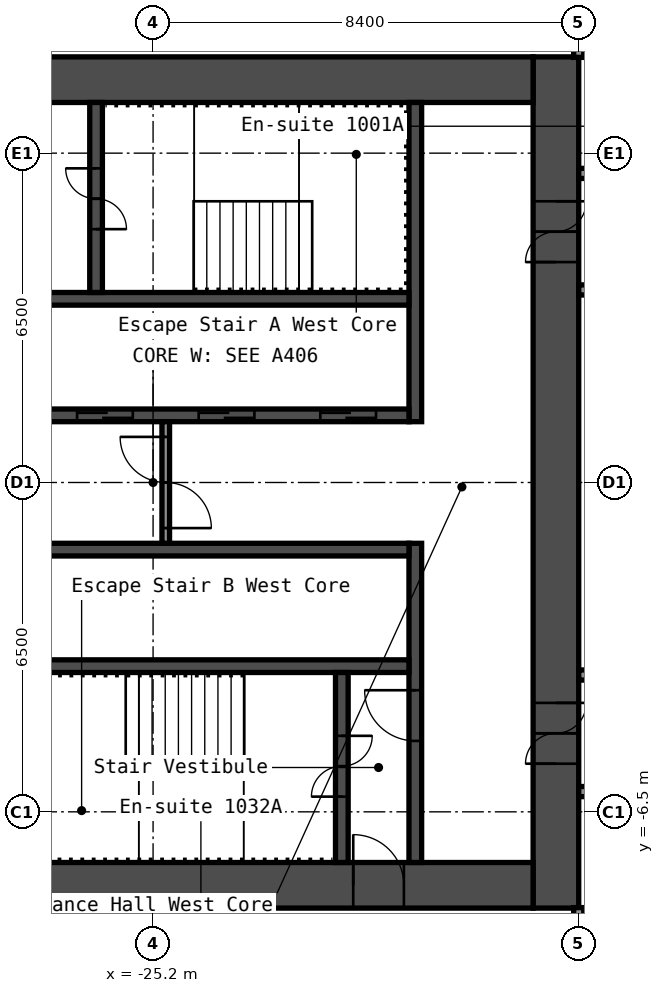
"""IFC4 building model, lengths in metres.
Left out: names, types, materials, properties, quantities, classifications, styles, units other than length and angle.
Written with IfcOpenShell. Run it as: python <this file> out.ifc"""

import sys

from ifc_helpers import new_model, si_unit, direction, frame, frame_2d, origin, place, context, subcontext, project, spatial, rectangle, extrude, element, fill, save


model = new_model("IFC4")
c1 = context("Model", 3, precision=1e-05, world=origin(), true_north=direction((0.0, 1.0)))
c2 = subcontext(c1, "Body", "Model", "MODEL_VIEW")
j1 = project(units=[si_unit("LENGTHUNIT", "METRE"), si_unit("PLANEANGLEUNIT", "RADIAN")], contexts=[c1])
p1 = place(None, origin())
s1 = spatial("IfcSite", under=j1, at=p1, CompositionType="ELEMENT")
p2 = place(p1, origin())
s2 = spatial("IfcBuilding", under=s1, at=p2, CompositionType="ELEMENT")
p3 = place(p2, frame((0.0, 0.0, 39.0)))
s3 = spatial("IfcBuildingStorey", under=s2, at=p3, CompositionType="ELEMENT", Elevation=39.0)
p4 = place(p3, frame((-17.25, -8.4, 0.0), z_axis=(0.0, 0.0, 1.0), x_axis=(0.0, 1.0, 0.0)))
e1 = element("IfcWall", 1, at=p4, inside=s3, PredefinedType="SHEAR", context=c2, shape_type="SweptSolid", body=[
    extrude(rectangle(XDim=16.8, YDim=0.9, at=frame_2d((8.4, 0.0))), origin(), (0.0, 0.0, 1.0), 2.8),
])
p5 = place(p4, frame((12.75, 0.0, 0.0)))
e2 = element("IfcOpeningElement", 2, at=p5, cuts=e1, PredefinedType="OPENING", context=c2, shape_type="SweptSolid", body=[
    extrude(rectangle(XDim=1.2, YDim=2.1, at=frame_2d((0.6, 1.05))), frame((0.0, 0.46, 0.0), z_axis=(0.0, -1.0, 0.0), x_axis=(1.0, 0.0, 0.0)), (0.0, 0.0, 1.0), 0.92),
])
p6 = place(p4, frame((2.85, 0.0, 0.0)))
e3 = element("IfcOpeningElement", 3, at=p6, cuts=e1, PredefinedType="OPENING", context=c2, shape_type="SweptSolid", body=[
    extrude(rectangle(XDim=1.2, YDim=2.1, at=frame_2d((0.6, 1.05))), frame((0.0, 0.46, 0.0), z_axis=(0.0, -1.0, 0.0), x_axis=(1.0, 0.0, 0.0)), (0.0, 0.0, 1.0), 0.92),
])
p7 = place(p3, frame((-32.7, 7.95, 0.0), z_axis=(0.0, 0.0, 1.0), x_axis=(1.0, 0.0, 0.0)))
e4 = element("IfcWall", 4, at=p7, inside=s3, PredefinedType="SHEAR", context=c2, shape_type="SweptSolid", body=[
    extrude(rectangle(XDim=15.0, YDim=0.9, at=frame_2d((7.5, 0.0))), origin(), (0.0, 0.0, 1.0), 2.8),
])
p8 = place(p7, frame((3.4, 0.0, 0.0)))
e5 = element("IfcOpeningElement", 5, at=p8, cuts=e4, PredefinedType="OPENING", context=c2, shape_type="SweptSolid", body=[
    extrude(rectangle(XDim=1.2, YDim=2.1, at=frame_2d((0.6, 1.05))), frame((0.0, 0.46, 0.0), z_axis=(0.0, -1.0, 0.0), x_axis=(1.0, 0.0, 0.0)), (0.0, 0.0, 1.0), 0.92),
])
p9 = place(p7, frame((0.75, 0.0, 0.0)))
e6 = element("IfcOpeningElement", 6, at=p9, cuts=e4, PredefinedType="OPENING", context=c2, shape_type="SweptSolid", body=[
    extrude(rectangle(XDim=0.9, YDim=2.1, at=frame_2d((0.45, 1.05))), frame((0.0, 0.46, 0.0), z_axis=(0.0, -1.0, 0.0), x_axis=(1.0, 0.0, 0.0)), (0.0, 0.0, 1.0), 0.92),
])
p10 = place(p3, frame((-32.7, -7.95, 0.0), z_axis=(0.0, 0.0, 1.0), x_axis=(1.0, 0.0, 0.0)))
e7 = element("IfcWall", 7, at=p10, inside=s3, PredefinedType="SHEAR", context=c2, shape_type="SweptSolid", body=[
    extrude(rectangle(XDim=15.0, YDim=0.9, at=frame_2d((7.5, 0.0))), origin(), (0.0, 0.0, 1.0), 2.8),
])
p11 = place(p10, frame((11.45, 0.0, 0.0)))
e8 = element("IfcOpeningElement", 8, at=p11, cuts=e7, PredefinedType="OPENING", context=c2, shape_type="SweptSolid", body=[
    extrude(rectangle(XDim=1.0, YDim=2.1, at=frame_2d((0.5, 1.05))), frame((0.0, 0.46, 0.0), z_axis=(0.0, -1.0, 0.0), x_axis=(1.0, 0.0, 0.0)), (0.0, 0.0, 1.0), 0.92),
])
p12 = place(p3, frame((-20.025, 1.2, 0.0), z_axis=(0.0, 0.0, 1.0), x_axis=(0.0, 1.0, 0.0)))
e9 = element("IfcWall", 9, at=p12, inside=s3, PredefinedType="SHEAR", context=c2, shape_type="SweptSolid", body=[
    extrude(rectangle(XDim=6.3, YDim=0.25, at=frame_2d((3.15, 0.0))), origin(), (0.0, 0.0, 1.0), 2.8),
])
p13 = place(p3, frame((-20.025, -7.5, 0.0), z_axis=(0.0, 0.0, 1.0), x_axis=(0.0, 1.0, 0.0)))
e10 = element("IfcWall", 10, at=p13, inside=s3, PredefinedType="SHEAR", context=c2, shape_type="SweptSolid", body=[
    extrude(rectangle(XDim=6.3, YDim=0.25, at=frame_2d((3.15, 0.0))), origin(), (0.0, 0.0, 1.0), 2.8),
])
p14 = place(p13, frame((2.4, 0.0, 0.0)))
e11 = element("IfcOpeningElement", 11, at=p14, cuts=e10, PredefinedType="OPENING", context=c2, shape_type="SweptSolid", body=[
    extrude(rectangle(XDim=1.0, YDim=2.1, at=frame_2d((0.5, 1.05))), frame((0.0, 0.135, 0.0), z_axis=(0.0, -1.0, 0.0), x_axis=(1.0, 0.0, 0.0)), (0.0, 0.0, 1.0), 0.27),
])
p15 = place(p3, frame((-27.65, 1.325, 0.0), z_axis=(0.0, 0.0, 1.0), x_axis=(1.0, 0.0, 0.0)))
e12 = element("IfcWall", 12, at=p15, inside=s3, PredefinedType="SHEAR", context=c2, shape_type="SweptSolid", body=[
    extrude(rectangle(XDim=7.5, YDim=0.25, at=frame_2d((3.75, 0.0))), origin(), (0.0, 0.0, 1.0), 2.8),
])
p16 = place(p15, frame((5.75, 0.0, 0.0)))
e13 = element("IfcOpeningElement", 13, at=p16, cuts=e12, PredefinedType="OPENING", context=c2, shape_type="SweptSolid", body=[
    extrude(rectangle(XDim=1.1, YDim=2.1, at=frame_2d((0.55, 1.05))), frame((0.0, 0.135, 0.0), z_axis=(0.0, -1.0, 0.0), x_axis=(1.0, 0.0, 0.0)), (0.0, 0.0, 1.0), 0.27),
])
p17 = place(p15, frame((3.35, 0.0, 0.0)))
e14 = element("IfcOpeningElement", 14, at=p17, cuts=e12, PredefinedType="OPENING", context=c2, shape_type="SweptSolid", body=[
    extrude(rectangle(XDim=1.1, YDim=2.1, at=frame_2d((0.55, 1.05))), frame((0.0, 0.135, 0.0), z_axis=(0.0, -1.0, 0.0), x_axis=(1.0, 0.0, 0.0)), (0.0, 0.0, 1.0), 0.27),
])
p18 = place(p15, frame((0.95, 0.0, 0.0)))
e15 = element("IfcOpeningElement", 15, at=p18, cuts=e12, PredefinedType="OPENING", context=c2, shape_type="SweptSolid", body=[
    extrude(rectangle(XDim=1.1, YDim=2.1, at=frame_2d((0.55, 1.05))), frame((0.0, 0.135, 0.0), z_axis=(0.0, -1.0, 0.0), x_axis=(1.0, 0.0, 0.0)), (0.0, 0.0, 1.0), 0.27),
])
p19 = place(p3, frame((-27.65, 3.625, 0.0), z_axis=(0.0, 0.0, 1.0), x_axis=(1.0, 0.0, 0.0)))
e16 = element("IfcWall", 16, at=p19, inside=s3, PredefinedType="SHEAR", context=c2, shape_type="SweptSolid", body=[
    extrude(rectangle(XDim=7.5, YDim=0.25, at=frame_2d((3.75, 0.0))), origin(), (0.0, 0.0, 1.0), 2.8),
])
p20 = place(p3, frame((-26.325, 3.75, 0.0), z_axis=(0.0, 0.0, 1.0), x_axis=(0.0, 1.0, 0.0)))
e17 = element("IfcWall", 17, at=p20, inside=s3, PredefinedType="SHEAR", context=c2, shape_type="SweptSolid", body=[
    extrude(rectangle(XDim=3.75, YDim=0.25, at=frame_2d((1.875, 0.0))), origin(), (0.0, 0.0, 1.0), 2.8),
])
p21 = place(p20, frame((1.25, 0.0, 0.0)))
e18 = element("IfcOpeningElement", 18, at=p21, cuts=e17, PredefinedType="OPENING", context=c2, shape_type="SweptSolid", body=[
    extrude(rectangle(XDim=1.2, YDim=2.1, at=frame_2d((0.6, 1.05))), frame((0.0, 0.135, 0.0), z_axis=(0.0, -1.0, 0.0), x_axis=(1.0, 0.0, 0.0)), (0.0, 0.0, 1.0), 0.27),
])
for number, where, z_axis, x_axis in (
    (19, (-27.65, -1.325, 0.0), (0.0, 0.0, 1.0), (1.0, 0.0, 0.0)),
    (20, (-27.65, -3.625, 0.0), (0.0, 0.0, 1.0), (1.0, 0.0, 0.0)),
):
    element("IfcWall", number, at=place(p3, frame(where, z_axis=z_axis, x_axis=x_axis)), inside=s3, PredefinedType="SHEAR", context=c2, shape_type="SweptSolid", body=[
        extrude(rectangle(XDim=7.5, YDim=0.25, at=frame_2d((3.75, 0.0))), origin(), (0.0, 0.0, 1.0), 2.8),
    ])
p22 = place(p3, frame((-21.475, -7.5, 0.0), z_axis=(0.0, 0.0, 1.0), x_axis=(0.0, 1.0, 0.0)))
e21 = element("IfcWall", 21, at=p22, inside=s3, PredefinedType="SHEAR", context=c2, shape_type="SweptSolid", body=[
    extrude(rectangle(XDim=3.75, YDim=0.25, at=frame_2d((1.875, 0.0))), origin(), (0.0, 0.0, 1.0), 2.8),
])
p23 = place(p22, frame((1.3, 0.0, 0.0)))
e22 = element("IfcOpeningElement", 22, at=p23, cuts=e21, PredefinedType="OPENING", context=c2, shape_type="SweptSolid", body=[
    extrude(rectangle(XDim=1.2, YDim=2.1, at=frame_2d((0.6, 1.05))), frame((0.0, 0.135, 0.0), z_axis=(0.0, -1.0, 0.0), x_axis=(1.0, 0.0, 0.0)), (0.0, 0.0, 1.0), 0.27),
])
p24 = place(p3, frame((-24.95, -1.2, 0.0), z_axis=(0.0, 0.0, 1.0), x_axis=(0.0, 1.0, 0.0)))
e23 = element("IfcWall", 23, at=p24, inside=s3, PredefinedType="PARTITIONING", context=c2, shape_type="SweptSolid", body=[
    extrude(rectangle(XDim=2.4, YDim=0.15, at=frame_2d((1.2, 0.0))), origin(), (0.0, 0.0, 1.0), 2.8),
])
p25 = place(p24, frame((0.3, 0.0, 0.0)))
e24 = element("IfcOpeningElement", 24, at=p25, cuts=e23, PredefinedType="OPENING", context=c2, shape_type="SweptSolid", body=[
    extrude(rectangle(XDim=1.8, YDim=2.1, at=frame_2d((0.9, 1.05))), frame((0.0, 0.085, 0.0), z_axis=(0.0, -1.0, 0.0), x_axis=(1.0, 0.0, 0.0)), (0.0, 0.0, 1.0), 0.17),
])
p26 = place(p3, frame((-16.8, -6.1, 0.0), z_axis=(0.0, 0.0, 1.0), x_axis=(1.0, 0.0, 0.0)))
e25 = element("IfcWall", 25, at=p26, inside=s3, PredefinedType="PARTITIONING", context=c2, shape_type="SweptSolid", body=[
    extrude(rectangle(XDim=33.6, YDim=0.2, at=frame_2d((16.8, 0.0))), origin(), (0.0, 0.0, 1.0), 2.8),
])
p27 = place(p26, frame((2.85, 0.0, 0.0)))
e26 = element("IfcOpeningElement", 26, at=p27, cuts=e25, PredefinedType="OPENING", context=c2, shape_type="SweptSolid", body=[
    extrude(rectangle(XDim=1.0, YDim=2.1, at=frame_2d((0.5, 1.05))), frame((0.0, 0.11, 0.0), z_axis=(0.0, -1.0, 0.0), x_axis=(1.0, 0.0, 0.0)), (0.0, 0.0, 1.0), 0.22),
])
p28 = place(p26, frame((4.55, 0.0, 0.0)))
e27 = element("IfcOpeningElement", 27, at=p28, cuts=e25, PredefinedType="OPENING", context=c2, shape_type="SweptSolid", body=[
    extrude(rectangle(XDim=1.0, YDim=2.1, at=frame_2d((0.5, 1.05))), frame((0.0, 0.11, 0.0), z_axis=(0.0, -1.0, 0.0), x_axis=(1.0, 0.0, 0.0)), (0.0, 0.0, 1.0), 0.22),
])
p29 = place(p26, frame((11.25, 0.0, 0.0)))
e28 = element("IfcOpeningElement", 28, at=p29, cuts=e25, PredefinedType="OPENING", context=c2, shape_type="SweptSolid", body=[
    extrude(rectangle(XDim=1.0, YDim=2.1, at=frame_2d((0.5, 1.05))), frame((0.0, 0.11, 0.0), z_axis=(0.0, -1.0, 0.0), x_axis=(1.0, 0.0, 0.0)), (0.0, 0.0, 1.0), 0.22),
])
p30 = place(p26, frame((12.95, 0.0, 0.0)))
e29 = element("IfcOpeningElement", 29, at=p30, cuts=e25, PredefinedType="OPENING", context=c2, shape_type="SweptSolid", body=[
    extrude(rectangle(XDim=1.0, YDim=2.1, at=frame_2d((0.5, 1.05))), frame((0.0, 0.11, 0.0), z_axis=(0.0, -1.0, 0.0), x_axis=(1.0, 0.0, 0.0)), (0.0, 0.0, 1.0), 0.22),
])
p31 = place(p26, frame((18.28, 0.0, 0.0)))
e30 = element("IfcOpeningElement", 30, at=p31, cuts=e25, PredefinedType="OPENING", context=c2, shape_type="SweptSolid", body=[
    extrude(rectangle(XDim=0.9, YDim=2.1, at=frame_2d((0.45, 1.05))), frame((0.0, 0.11, 0.0), z_axis=(0.0, -1.0, 0.0), x_axis=(1.0, 0.0, 0.0)), (0.0, 0.0, 1.0), 0.22),
])
p32 = place(p26, frame((22.48, 0.0, 0.0)))
e31 = element("IfcOpeningElement", 31, at=p32, cuts=e25, PredefinedType="OPENING", context=c2, shape_type="SweptSolid", body=[
    extrude(rectangle(XDim=0.9, YDim=2.1, at=frame_2d((0.45, 1.05))), frame((0.0, 0.11, 0.0), z_axis=(0.0, -1.0, 0.0), x_axis=(1.0, 0.0, 0.0)), (0.0, 0.0, 1.0), 0.22),
])
p33 = place(p26, frame((28.05, 0.0, 0.0)))
e32 = element("IfcOpeningElement", 32, at=p33, cuts=e25, PredefinedType="OPENING", context=c2, shape_type="SweptSolid", body=[
    extrude(rectangle(XDim=1.0, YDim=2.1, at=frame_2d((0.5, 1.05))), frame((0.0, 0.11, 0.0), z_axis=(0.0, -1.0, 0.0), x_axis=(1.0, 0.0, 0.0)), (0.0, 0.0, 1.0), 0.22),
])
p34 = place(p26, frame((29.75, 0.0, 0.0)))
e33 = element("IfcOpeningElement", 33, at=p34, cuts=e25, PredefinedType="OPENING", context=c2, shape_type="SweptSolid", body=[
    extrude(rectangle(XDim=1.0, YDim=2.1, at=frame_2d((0.5, 1.05))), frame((0.0, 0.11, 0.0), z_axis=(0.0, -1.0, 0.0), x_axis=(1.0, 0.0, 0.0)), (0.0, 0.0, 1.0), 0.22),
])
p35 = place(p3, frame((-16.8, -3.8, 0.0), z_axis=(0.0, 0.0, 1.0), x_axis=(1.0, 0.0, 0.0)))
e34 = element("IfcWall", 34, at=p35, inside=s3, PredefinedType="PARTITIONING", context=c2, shape_type="SweptSolid", body=[
    extrude(rectangle(XDim=33.6, YDim=0.2, at=frame_2d((16.8, 0.0))), origin(), (0.0, 0.0, 1.0), 2.8),
])
p36 = place(p35, frame((10.22, 0.0, 0.0)))
e35 = element("IfcOpeningElement", 35, at=p36, cuts=e34, PredefinedType="OPENING", context=c2, shape_type="SweptSolid", body=[
    extrude(rectangle(XDim=0.9, YDim=2.1, at=frame_2d((0.45, 1.05))), frame((0.0, 0.11, 0.0), z_axis=(0.0, -1.0, 0.0), x_axis=(1.0, 0.0, 0.0)), (0.0, 0.0, 1.0), 0.22),
])
p37 = place(p35, frame((14.42, 0.0, 0.0)))
e36 = element("IfcOpeningElement", 36, at=p37, cuts=e34, PredefinedType="OPENING", context=c2, shape_type="SweptSolid", body=[
    extrude(rectangle(XDim=0.9, YDim=2.1, at=frame_2d((0.45, 1.05))), frame((0.0, 0.11, 0.0), z_axis=(0.0, -1.0, 0.0), x_axis=(1.0, 0.0, 0.0)), (0.0, 0.0, 1.0), 0.22),
])
p38 = place(p35, frame((27.1, 0.0, 0.0)))
e37 = element("IfcOpeningElement", 37, at=p38, cuts=e34, PredefinedType="OPENING", context=c2, shape_type="SweptSolid", body=[
    extrude(rectangle(XDim=0.9, YDim=2.1, at=frame_2d((0.45, 1.05))), frame((0.0, 0.11, 0.0), z_axis=(0.0, -1.0, 0.0), x_axis=(1.0, 0.0, 0.0)), (0.0, 0.0, 1.0), 0.22),
])
p39 = place(p35, frame((31.3, 0.0, 0.0)))
e38 = element("IfcOpeningElement", 38, at=p39, cuts=e34, PredefinedType="OPENING", context=c2, shape_type="SweptSolid", body=[
    extrude(rectangle(XDim=0.9, YDim=2.1, at=frame_2d((0.45, 1.05))), frame((0.0, 0.11, 0.0), z_axis=(0.0, -1.0, 0.0), x_axis=(1.0, 0.0, 0.0)), (0.0, 0.0, 1.0), 0.22),
])
p40 = place(p3, frame((-16.8, 3.8, 0.0), z_axis=(0.0, 0.0, 1.0), x_axis=(1.0, 0.0, 0.0)))
e39 = element("IfcWall", 39, at=p40, inside=s3, PredefinedType="PARTITIONING", context=c2, shape_type="SweptSolid", body=[
    extrude(rectangle(XDim=33.6, YDim=0.2, at=frame_2d((16.8, 0.0))), origin(), (0.0, 0.0, 1.0), 2.8),
])
p41 = place(p40, frame((1.145, 0.0, 0.0)))
e40 = element("IfcOpeningElement", 40, at=p41, cuts=e39, PredefinedType="OPENING", context=c2, shape_type="SweptSolid", body=[
    extrude(rectangle(XDim=0.9, YDim=2.1, at=frame_2d((0.45, 1.05))), frame((0.0, 0.11, 0.0), z_axis=(0.0, -1.0, 0.0), x_axis=(1.0, 0.0, 0.0)), (0.0, 0.0, 1.0), 0.22),
])
p42 = place(p40, frame((5.345, 0.0, 0.0)))
e41 = element("IfcOpeningElement", 41, at=p42, cuts=e39, PredefinedType="OPENING", context=c2, shape_type="SweptSolid", body=[
    extrude(rectangle(XDim=0.9, YDim=2.1, at=frame_2d((0.45, 1.05))), frame((0.0, 0.11, 0.0), z_axis=(0.0, -1.0, 0.0), x_axis=(1.0, 0.0, 0.0)), (0.0, 0.0, 1.0), 0.22),
])
p43 = place(p40, frame((18.87, 0.0, 0.0)))
e42 = element("IfcOpeningElement", 42, at=p43, cuts=e39, PredefinedType="OPENING", context=c2, shape_type="SweptSolid", body=[
    extrude(rectangle(XDim=0.9, YDim=2.1, at=frame_2d((0.45, 1.05))), frame((0.0, 0.11, 0.0), z_axis=(0.0, -1.0, 0.0), x_axis=(1.0, 0.0, 0.0)), (0.0, 0.0, 1.0), 0.22),
])
p44 = place(p40, frame((23.07, 0.0, 0.0)))
e43 = element("IfcOpeningElement", 43, at=p44, cuts=e39, PredefinedType="OPENING", context=c2, shape_type="SweptSolid", body=[
    extrude(rectangle(XDim=0.9, YDim=2.1, at=frame_2d((0.45, 1.05))), frame((0.0, 0.11, 0.0), z_axis=(0.0, -1.0, 0.0), x_axis=(1.0, 0.0, 0.0)), (0.0, 0.0, 1.0), 0.22),
])
p45 = place(p3, frame((-16.8, 6.1, 0.0), z_axis=(0.0, 0.0, 1.0), x_axis=(1.0, 0.0, 0.0)))
e44 = element("IfcWall", 44, at=p45, inside=s3, PredefinedType="PARTITIONING", context=c2, shape_type="SweptSolid", body=[
    extrude(rectangle(XDim=33.6, YDim=0.2, at=frame_2d((16.8, 0.0))), origin(), (0.0, 0.0, 1.0), 2.8),
])
p46 = place(p45, frame((2.85, 0.0, 0.0)))
e45 = element("IfcOpeningElement", 45, at=p46, cuts=e44, PredefinedType="OPENING", context=c2, shape_type="SweptSolid", body=[
    extrude(rectangle(XDim=1.0, YDim=2.1, at=frame_2d((0.5, 1.05))), frame((0.0, 0.11, 0.0), z_axis=(0.0, -1.0, 0.0), x_axis=(1.0, 0.0, 0.0)), (0.0, 0.0, 1.0), 0.22),
])
p47 = place(p45, frame((4.55, 0.0, 0.0)))
e46 = element("IfcOpeningElement", 46, at=p47, cuts=e44, PredefinedType="OPENING", context=c2, shape_type="SweptSolid", body=[
    extrude(rectangle(XDim=1.0, YDim=2.1, at=frame_2d((0.5, 1.05))), frame((0.0, 0.11, 0.0), z_axis=(0.0, -1.0, 0.0), x_axis=(1.0, 0.0, 0.0)), (0.0, 0.0, 1.0), 0.22),
])
p48 = place(p45, frame((10.555, 0.0, 0.0)))
e47 = element("IfcOpeningElement", 47, at=p48, cuts=e44, PredefinedType="OPENING", context=c2, shape_type="SweptSolid", body=[
    extrude(rectangle(XDim=0.9, YDim=2.1, at=frame_2d((0.45, 1.05))), frame((0.0, 0.11, 0.0), z_axis=(0.0, -1.0, 0.0), x_axis=(1.0, 0.0, 0.0)), (0.0, 0.0, 1.0), 0.22),
])
p49 = place(p45, frame((14.755, 0.0, 0.0)))
e48 = element("IfcOpeningElement", 48, at=p49, cuts=e44, PredefinedType="OPENING", context=c2, shape_type="SweptSolid", body=[
    extrude(rectangle(XDim=0.9, YDim=2.1, at=frame_2d((0.45, 1.05))), frame((0.0, 0.11, 0.0), z_axis=(0.0, -1.0, 0.0), x_axis=(1.0, 0.0, 0.0)), (0.0, 0.0, 1.0), 0.22),
])
p50 = place(p45, frame((19.65, 0.0, 0.0)))
e49 = element("IfcOpeningElement", 49, at=p50, cuts=e44, PredefinedType="OPENING", context=c2, shape_type="SweptSolid", body=[
    extrude(rectangle(XDim=1.0, YDim=2.1, at=frame_2d((0.5, 1.05))), frame((0.0, 0.11, 0.0), z_axis=(0.0, -1.0, 0.0), x_axis=(1.0, 0.0, 0.0)), (0.0, 0.0, 1.0), 0.22),
])
p51 = place(p45, frame((21.35, 0.0, 0.0)))
e50 = element("IfcOpeningElement", 50, at=p51, cuts=e44, PredefinedType="OPENING", context=c2, shape_type="SweptSolid", body=[
    extrude(rectangle(XDim=1.0, YDim=2.1, at=frame_2d((0.5, 1.05))), frame((0.0, 0.11, 0.0), z_axis=(0.0, -1.0, 0.0), x_axis=(1.0, 0.0, 0.0)), (0.0, 0.0, 1.0), 0.22),
])
p52 = place(p45, frame((28.05, 0.0, 0.0)))
e51 = element("IfcOpeningElement", 51, at=p52, cuts=e44, PredefinedType="OPENING", context=c2, shape_type="SweptSolid", body=[
    extrude(rectangle(XDim=1.0, YDim=2.1, at=frame_2d((0.5, 1.05))), frame((0.0, 0.11, 0.0), z_axis=(0.0, -1.0, 0.0), x_axis=(1.0, 0.0, 0.0)), (0.0, 0.0, 1.0), 0.22),
])
p53 = place(p45, frame((29.75, 0.0, 0.0)))
e52 = element("IfcOpeningElement", 52, at=p53, cuts=e44, PredefinedType="OPENING", context=c2, shape_type="SweptSolid", body=[
    extrude(rectangle(XDim=1.0, YDim=2.1, at=frame_2d((0.5, 1.05))), frame((0.0, 0.11, 0.0), z_axis=(0.0, -1.0, 0.0), x_axis=(1.0, 0.0, 0.0)), (0.0, 0.0, 1.0), 0.22),
])
for number, where, z_axis, x_axis in (
    (53, (-16.8, -20.3, 0.0), (0.0, 0.0, 1.0), (0.0, 1.0, 0.0)),
    (54, (-16.8, 8.39, 0.0), (0.0, 0.0, 1.0), (0.0, 1.0, 0.0)),
):
    element("IfcWall", number, at=place(p3, frame(where, z_axis=z_axis, x_axis=x_axis)), inside=s3, PredefinedType="PARTITIONING", context=c2, shape_type="SweptSolid", body=[
        extrude(rectangle(XDim=11.91, YDim=0.2, at=frame_2d((5.955, 0.0))), origin(), (0.0, 0.0, 1.0), 2.8),
    ])
p54 = place(p5, origin())
e55 = element("IfcDoor", 55, at=p54, inside=s3, OperationType="DOUBLE_DOOR_SINGLE_SWING", PredefinedType="DOOR", context=c2, shape_type="SweptSolid", body=[
    extrude(rectangle(XDim=1.2, YDim=2.1, at=frame_2d((0.6, 1.05))), frame((0.0, 0.025, 0.0), z_axis=(0.0, -1.0, 0.0), x_axis=(1.0, 0.0, 0.0)), (0.0, 0.0, 1.0), 0.05),
])
fill(e2, e55)
p55 = place(p6, origin())
e56 = element("IfcDoor", 56, at=p55, inside=s3, OperationType="DOUBLE_DOOR_SINGLE_SWING", PredefinedType="DOOR", context=c2, shape_type="SweptSolid", body=[
    extrude(rectangle(XDim=1.2, YDim=2.1, at=frame_2d((0.6, 1.05))), frame((0.0, 0.025, 0.0), z_axis=(0.0, -1.0, 0.0), x_axis=(1.0, 0.0, 0.0)), (0.0, 0.0, 1.0), 0.05),
])
fill(e3, e56)
p56 = place(p11, origin())
e57 = element("IfcDoor", 57, at=p56, inside=s3, OperationType="SINGLE_SWING_RIGHT", PredefinedType="DOOR", context=c2, shape_type="SweptSolid", body=[
    extrude(rectangle(XDim=1.0, YDim=2.1, at=frame_2d((0.5, 1.05))), frame((0.0, 0.025, 0.0), z_axis=(0.0, -1.0, 0.0), x_axis=(1.0, 0.0, 0.0)), (0.0, 0.0, 1.0), 0.05),
])
fill(e8, e57)
p57 = place(p21, origin())
e58 = element("IfcDoor", 58, at=p57, inside=s3, OperationType="DOUBLE_DOOR_SINGLE_SWING", PredefinedType="DOOR", context=c2, shape_type="SweptSolid", body=[
    extrude(rectangle(XDim=1.2, YDim=2.1, at=frame_2d((0.6, 1.05))), frame((0.0, 0.025, 0.0), z_axis=(0.0, -1.0, 0.0), x_axis=(1.0, 0.0, 0.0)), (0.0, 0.0, 1.0), 0.05),
])
fill(e18, e58)
p58 = place(p23, origin())
e59 = element("IfcDoor", 59, at=p58, inside=s3, OperationType="DOUBLE_DOOR_SINGLE_SWING", PredefinedType="DOOR", context=c2, shape_type="SweptSolid", body=[
    extrude(rectangle(XDim=1.2, YDim=2.1, at=frame_2d((0.6, 1.05))), frame((0.0, 0.025, 0.0), z_axis=(0.0, -1.0, 0.0), x_axis=(1.0, 0.0, 0.0)), (0.0, 0.0, 1.0), 0.05),
])
fill(e22, e59)
p59 = place(p14, origin())
e60 = element("IfcDoor", 60, at=p59, inside=s3, OperationType="SINGLE_SWING_LEFT", PredefinedType="DOOR", context=c2, shape_type="SweptSolid", body=[
    extrude(rectangle(XDim=1.0, YDim=2.1, at=frame_2d((0.5, 1.05))), frame((0.0, 0.025, 0.0), z_axis=(0.0, -1.0, 0.0), x_axis=(1.0, 0.0, 0.0)), (0.0, 0.0, 1.0), 0.05),
])
fill(e11, e60)
p60 = place(p25, origin())
e61 = element("IfcDoor", 61, at=p60, inside=s3, OperationType="DOUBLE_DOOR_SINGLE_SWING", PredefinedType="DOOR", context=c2, shape_type="SweptSolid", body=[
    extrude(rectangle(XDim=1.8, YDim=2.1, at=frame_2d((0.9, 1.05))), frame((0.0, 0.025, 0.0), z_axis=(0.0, -1.0, 0.0), x_axis=(1.0, 0.0, 0.0)), (0.0, 0.0, 1.0), 0.05),
])
fill(e24, e61)
p61 = place(p16, origin())
e62 = element("IfcDoor", 62, at=p61, inside=s3, OperationType="DOUBLE_DOOR_SLIDING", PredefinedType="DOOR", context=c2, shape_type="SweptSolid", body=[
    extrude(rectangle(XDim=1.1, YDim=2.1, at=frame_2d((0.55, 1.05))), frame((0.0, 0.025, 0.0), z_axis=(0.0, -1.0, 0.0), x_axis=(1.0, 0.0, 0.0)), (0.0, 0.0, 1.0), 0.05),
])
fill(e13, e62)
p62 = place(p17, origin())
e63 = element("IfcDoor", 63, at=p62, inside=s3, OperationType="DOUBLE_DOOR_SLIDING", PredefinedType="DOOR", context=c2, shape_type="SweptSolid", body=[
    extrude(rectangle(XDim=1.1, YDim=2.1, at=frame_2d((0.55, 1.05))), frame((0.0, 0.025, 0.0), z_axis=(0.0, -1.0, 0.0), x_axis=(1.0, 0.0, 0.0)), (0.0, 0.0, 1.0), 0.05),
])
fill(e14, e63)
p63 = place(p18, origin())
e64 = element("IfcDoor", 64, at=p63, inside=s3, OperationType="DOUBLE_DOOR_SLIDING", PredefinedType="DOOR", context=c2, shape_type="SweptSolid", body=[
    extrude(rectangle(XDim=1.1, YDim=2.1, at=frame_2d((0.55, 1.05))), frame((0.0, 0.025, 0.0), z_axis=(0.0, -1.0, 0.0), x_axis=(1.0, 0.0, 0.0)), (0.0, 0.0, 1.0), 0.05),
])
fill(e15, e64)
save(model, sys.argv[1])
